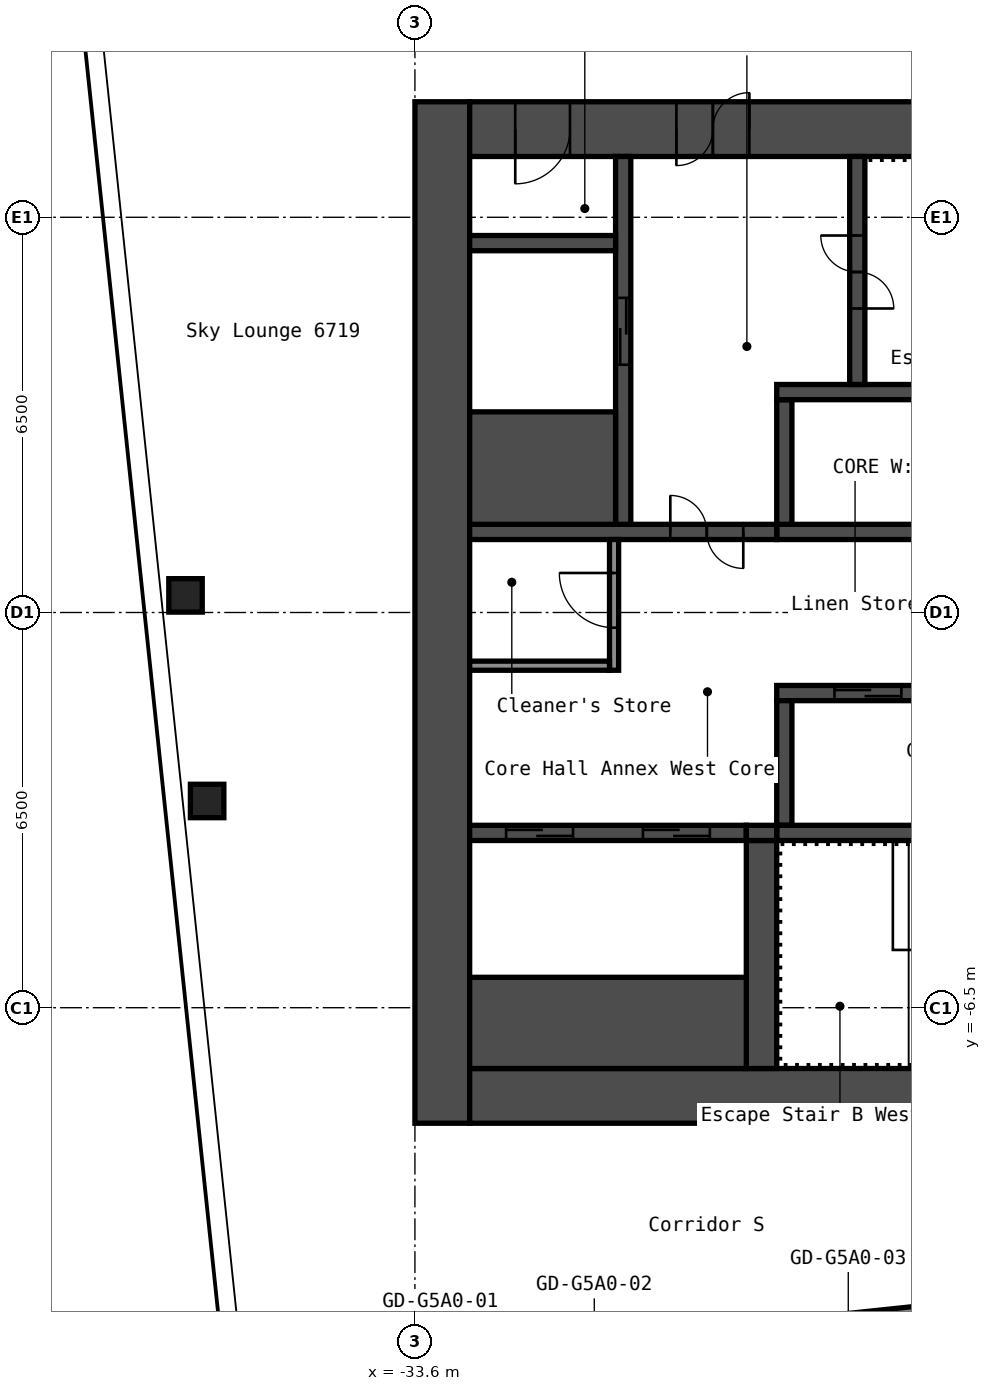
"""IFC4 building model, lengths in metres.
Left out: names, types, materials, properties, quantities, classifications, styles, units other than length and angle.
Written with IfcOpenShell. Run it as: python <this file> out.ifc"""

import sys

from ifc_helpers import new_model, si_unit, direction, frame, frame_2d, origin, origin_2d, place, context, subcontext, project, spatial, rectangle, hollow_rectangle, extrude, element, fill, save


model = new_model("IFC4")
c1 = context("Model", 3, precision=1e-05, world=origin(), true_north=direction((0.0, 1.0)))
c2 = subcontext(c1, "Body", "Model", "MODEL_VIEW")
j1 = project(units=[si_unit("LENGTHUNIT", "METRE"), si_unit("PLANEANGLEUNIT", "RADIAN")], contexts=[c1])
p1 = place(None, origin())
s1 = spatial("IfcSite", under=j1, at=p1, CompositionType="ELEMENT")
p2 = place(p1, origin())
s2 = spatial("IfcBuilding", under=s1, at=p2, CompositionType="ELEMENT")
p3 = place(p2, frame((0.0, 0.0, 239.0)))
s3 = spatial("IfcBuildingStorey", under=s2, at=p3, CompositionType="ELEMENT", Elevation=239.0)
for number, where, z_axis, x_axis in (
    (1, (-37.017, -3.1, 0.0), (0.0, 0.0, 1.0), (1.0, 0.0, 0.0)),
    (2, (-37.373, 0.281, 0.0), (0.0, 0.0, 1.0), (1.0, 0.0, 0.0)),
):
    element("IfcColumn", number, at=place(p3, frame(where, z_axis=z_axis, x_axis=x_axis)), inside=s3, PredefinedType="COLUMN", context=c2, shape_type="SweptSolid", body=[
        extrude(hollow_rectangle(XDim=0.55, YDim=0.55, WallThickness=0.022, InnerFilletRadius=0.033, OuterFilletRadius=0.055, at=origin_2d()), origin(), (0.0, 0.0, 1.0), 2.75),
    ])
p4 = place(p3, frame((-33.15, -8.4, 0.0), z_axis=(0.0, 0.0, 1.0), x_axis=(0.0, 1.0, 0.0)))
e3 = element("IfcWall", 3, at=p4, inside=s3, PredefinedType="SHEAR", context=c2, shape_type="SweptSolid", body=[
    extrude(rectangle(XDim=16.8, YDim=0.9, at=frame_2d((8.4, 0.0))), origin(), (0.0, 0.0, 1.0), 2.75),
])
p5 = place(p3, frame((-32.7, 7.95, 0.0), z_axis=(0.0, 0.0, 1.0), x_axis=(1.0, 0.0, 0.0)))
e4 = element("IfcWall", 4, at=p5, inside=s3, PredefinedType="SHEAR", context=c2, shape_type="SweptSolid", body=[
    extrude(rectangle(XDim=15.0, YDim=0.9, at=frame_2d((7.5, 0.0))), origin(), (0.0, 0.0, 1.0), 2.75),
])
p6 = place(p5, frame((3.4, 0.0, 0.0)))
e5 = element("IfcOpeningElement", 5, at=p6, cuts=e4, PredefinedType="OPENING", context=c2, shape_type="SweptSolid", body=[
    extrude(rectangle(XDim=1.2, YDim=2.1, at=frame_2d((0.6, 1.05))), frame((0.0, 0.46, 0.0), z_axis=(0.0, -1.0, 0.0), x_axis=(1.0, 0.0, 0.0)), (0.0, 0.0, 1.0), 0.92),
])
p7 = place(p5, frame((0.75, 0.0, 0.0)))
e6 = element("IfcOpeningElement", 6, at=p7, cuts=e4, PredefinedType="OPENING", context=c2, shape_type="SweptSolid", body=[
    extrude(rectangle(XDim=0.9, YDim=2.1, at=frame_2d((0.45, 1.05))), frame((0.0, 0.46, 0.0), z_axis=(0.0, -1.0, 0.0), x_axis=(1.0, 0.0, 0.0)), (0.0, 0.0, 1.0), 0.92),
])
p8 = place(p3, frame((-32.7, -7.95, 0.0), z_axis=(0.0, 0.0, 1.0), x_axis=(1.0, 0.0, 0.0)))
e7 = element("IfcWall", 7, at=p8, inside=s3, PredefinedType="SHEAR", context=c2, shape_type="SweptSolid", body=[
    extrude(rectangle(XDim=15.0, YDim=0.9, at=frame_2d((7.5, 0.0))), origin(), (0.0, 0.0, 1.0), 2.75),
])
p9 = place(p8, frame((11.45, 0.0, 0.0)))
e8 = element("IfcOpeningElement", 8, at=p9, cuts=e7, PredefinedType="OPENING", context=c2, shape_type="SweptSolid", body=[
    extrude(rectangle(XDim=1.0, YDim=2.1, at=frame_2d((0.5, 1.05))), frame((0.0, 0.46, 0.0), z_axis=(0.0, -1.0, 0.0), x_axis=(1.0, 0.0, 0.0)), (0.0, 0.0, 1.0), 0.92),
])
p10 = place(p3, frame((-27.65, 1.325, 0.0), z_axis=(0.0, 0.0, 1.0), x_axis=(1.0, 0.0, 0.0)))
e9 = element("IfcWall", 9, at=p10, inside=s3, PredefinedType="SHEAR", context=c2, shape_type="SweptSolid", body=[
    extrude(rectangle(XDim=7.5, YDim=0.25, at=frame_2d((3.75, 0.0))), origin(), (0.0, 0.0, 1.0), 2.75),
])
p11 = place(p10, frame((6.212, 0.0, 0.0)))
e10 = element("IfcOpeningElement", 10, at=p11, cuts=e9, PredefinedType="OPENING", context=c2, shape_type="SweptSolid", body=[
    extrude(rectangle(XDim=0.9, YDim=2.1, at=frame_2d((0.45, 1.05))), frame((0.0, 0.135, 0.0), z_axis=(0.0, -1.0, 0.0), x_axis=(1.0, 0.0, 0.0)), (0.0, 0.0, 1.0), 0.27),
])
p12 = place(p10, frame((2.512, 0.0, 0.0)))
e11 = element("IfcOpeningElement", 11, at=p12, cuts=e9, PredefinedType="OPENING", context=c2, shape_type="SweptSolid", body=[
    extrude(rectangle(XDim=0.9, YDim=2.1, at=frame_2d((0.45, 1.05))), frame((0.0, 0.135, 0.0), z_axis=(0.0, -1.0, 0.0), x_axis=(1.0, 0.0, 0.0)), (0.0, 0.0, 1.0), 0.27),
])
p13 = place(p3, frame((-27.525, 1.45, 0.0), z_axis=(0.0, 0.0, 1.0), x_axis=(0.0, 1.0, 0.0)))
e12 = element("IfcWall", 12, at=p13, inside=s3, PredefinedType="SHEAR", context=c2, shape_type="SweptSolid", body=[
    extrude(rectangle(XDim=2.05, YDim=0.25, at=frame_2d((1.025, 0.0))), origin(), (0.0, 0.0, 1.0), 2.75),
])
p14 = place(p3, frame((-27.65, 3.625, 0.0), z_axis=(0.0, 0.0, 1.0), x_axis=(1.0, 0.0, 0.0)))
e13 = element("IfcWall", 13, at=p14, inside=s3, PredefinedType="SHEAR", context=c2, shape_type="SweptSolid", body=[
    extrude(rectangle(XDim=7.5, YDim=0.25, at=frame_2d((3.75, 0.0))), origin(), (0.0, 0.0, 1.0), 2.75),
])
p15 = place(p3, frame((-26.325, 3.75, 0.0), z_axis=(0.0, 0.0, 1.0), x_axis=(0.0, 1.0, 0.0)))
e14 = element("IfcWall", 14, at=p15, inside=s3, PredefinedType="SHEAR", context=c2, shape_type="SweptSolid", body=[
    extrude(rectangle(XDim=3.75, YDim=0.25, at=frame_2d((1.875, 0.0))), origin(), (0.0, 0.0, 1.0), 2.75),
])
p16 = place(p15, frame((1.25, 0.0, 0.0)))
e15 = element("IfcOpeningElement", 15, at=p16, cuts=e14, PredefinedType="OPENING", context=c2, shape_type="SweptSolid", body=[
    extrude(rectangle(XDim=1.2, YDim=2.1, at=frame_2d((0.6, 1.05))), frame((0.0, 0.135, 0.0), z_axis=(0.0, -1.0, 0.0), x_axis=(1.0, 0.0, 0.0)), (0.0, 0.0, 1.0), 0.27),
])
p17 = place(p3, frame((-32.7, 1.325, 0.0), z_axis=(0.0, 0.0, 1.0), x_axis=(1.0, 0.0, 0.0)))
e16 = element("IfcWall", 16, at=p17, inside=s3, PredefinedType="SHEAR", context=c2, shape_type="SweptSolid", body=[
    extrude(rectangle(XDim=5.05, YDim=0.25, at=frame_2d((2.525, 0.0))), origin(), (0.0, 0.0, 1.0), 2.75),
])
p18 = place(p17, frame((3.3, 0.0, 0.0)))
e17 = element("IfcOpeningElement", 17, at=p18, cuts=e16, PredefinedType="OPENING", context=c2, shape_type="SweptSolid", body=[
    extrude(rectangle(XDim=1.2, YDim=2.1, at=frame_2d((0.6, 1.05))), frame((0.0, 0.135, 0.0), z_axis=(0.0, -1.0, 0.0), x_axis=(1.0, 0.0, 0.0)), (0.0, 0.0, 1.0), 0.27),
])
p19 = place(p3, frame((-30.175, 1.45, 0.0), z_axis=(0.0, 0.0, 1.0), x_axis=(0.0, 1.0, 0.0)))
e18 = element("IfcWall", 18, at=p19, inside=s3, PredefinedType="SHEAR", context=c2, shape_type="SweptSolid", body=[
    extrude(rectangle(XDim=6.05, YDim=0.25, at=frame_2d((3.025, 0.0))), origin(), (0.0, 0.0, 1.0), 2.75),
])
p20 = place(p19, frame((2.625, 0.0, 0.0)))
e19 = element("IfcOpeningElement", 19, at=p20, cuts=e18, PredefinedType="OPENING", context=c2, shape_type="SweptSolid", body=[
    extrude(rectangle(XDim=1.1, YDim=2.1, at=frame_2d((0.55, 1.05))), frame((0.0, 0.135, 0.0), z_axis=(0.0, -1.0, 0.0), x_axis=(1.0, 0.0, 0.0)), (0.0, 0.0, 1.0), 0.27),
])
p21 = place(p3, frame((-32.7, 2.375, 0.0), z_axis=(0.0, 0.0, 1.0), x_axis=(1.0, 0.0, 0.0)))
e20 = element("IfcWall", 20, at=p21, inside=s3, PredefinedType="SHEAR", context=c2, shape_type="SweptSolid", body=[
    extrude(rectangle(XDim=2.4, YDim=1.85, at=frame_2d((1.2, 0.0))), origin(), (0.0, 0.0, 1.0), 2.75),
])
p22 = place(p3, frame((-32.7, 6.075, 0.0), z_axis=(0.0, 0.0, 1.0), x_axis=(1.0, 0.0, 0.0)))
e21 = element("IfcWall", 21, at=p22, inside=s3, PredefinedType="SHEAR", context=c2, shape_type="SweptSolid", body=[
    extrude(rectangle(XDim=2.4, YDim=0.25, at=frame_2d((1.2, 0.0))), origin(), (0.0, 0.0, 1.0), 2.75),
])
p23 = place(p3, frame((-27.65, -1.325, 0.0), z_axis=(0.0, 0.0, 1.0), x_axis=(1.0, 0.0, 0.0)))
e22 = element("IfcWall", 22, at=p23, inside=s3, PredefinedType="SHEAR", context=c2, shape_type="SweptSolid", body=[
    extrude(rectangle(XDim=7.5, YDim=0.25, at=frame_2d((3.75, 0.0))), origin(), (0.0, 0.0, 1.0), 2.75),
])
p24 = place(p23, frame((5.75, 0.0, 0.0)))
e23 = element("IfcOpeningElement", 23, at=p24, cuts=e22, PredefinedType="OPENING", context=c2, shape_type="SweptSolid", body=[
    extrude(rectangle(XDim=1.1, YDim=2.1, at=frame_2d((0.55, 1.05))), frame((0.0, 0.135, 0.0), z_axis=(0.0, -1.0, 0.0), x_axis=(1.0, 0.0, 0.0)), (0.0, 0.0, 1.0), 0.27),
])
p25 = place(p23, frame((3.35, 0.0, 0.0)))
e24 = element("IfcOpeningElement", 24, at=p25, cuts=e22, PredefinedType="OPENING", context=c2, shape_type="SweptSolid", body=[
    extrude(rectangle(XDim=1.1, YDim=2.1, at=frame_2d((0.55, 1.05))), frame((0.0, 0.135, 0.0), z_axis=(0.0, -1.0, 0.0), x_axis=(1.0, 0.0, 0.0)), (0.0, 0.0, 1.0), 0.27),
])
p26 = place(p23, frame((0.95, 0.0, 0.0)))
e25 = element("IfcOpeningElement", 25, at=p26, cuts=e22, PredefinedType="OPENING", context=c2, shape_type="SweptSolid", body=[
    extrude(rectangle(XDim=1.1, YDim=2.1, at=frame_2d((0.55, 1.05))), frame((0.0, 0.135, 0.0), z_axis=(0.0, -1.0, 0.0), x_axis=(1.0, 0.0, 0.0)), (0.0, 0.0, 1.0), 0.27),
])
p27 = place(p3, frame((-27.525, -3.5, 0.0), z_axis=(0.0, 0.0, 1.0), x_axis=(0.0, 1.0, 0.0)))
e26 = element("IfcWall", 26, at=p27, inside=s3, PredefinedType="SHEAR", context=c2, shape_type="SweptSolid", body=[
    extrude(rectangle(XDim=2.05, YDim=0.25, at=frame_2d((1.025, 0.0))), origin(), (0.0, 0.0, 1.0), 2.75),
])
p28 = place(p3, frame((-27.65, -3.625, 0.0), z_axis=(0.0, 0.0, 1.0), x_axis=(1.0, 0.0, 0.0)))
e27 = element("IfcWall", 27, at=p28, inside=s3, PredefinedType="SHEAR", context=c2, shape_type="SweptSolid", body=[
    extrude(rectangle(XDim=7.5, YDim=0.25, at=frame_2d((3.75, 0.0))), origin(), (0.0, 0.0, 1.0), 2.75),
])
p29 = place(p3, frame((-27.9, -7.5, 0.0), z_axis=(0.0, 0.0, 1.0), x_axis=(0.0, 1.0, 0.0)))
e28 = element("IfcWall", 28, at=p29, inside=s3, PredefinedType="SHEAR", context=c2, shape_type="SweptSolid", body=[
    extrude(rectangle(XDim=3.75, YDim=0.5, at=frame_2d((1.875, 0.0))), origin(), (0.0, 0.0, 1.0), 2.75),
])
p30 = place(p3, frame((-32.7, -3.625, 0.0), z_axis=(0.0, 0.0, 1.0), x_axis=(1.0, 0.0, 0.0)))
e29 = element("IfcWall", 29, at=p30, inside=s3, PredefinedType="SHEAR", context=c2, shape_type="SweptSolid", body=[
    extrude(rectangle(XDim=4.55, YDim=0.25, at=frame_2d((2.275, 0.0))), origin(), (0.0, 0.0, 1.0), 2.75),
])
p31 = place(p30, frame((2.85, 0.0, 0.0)))
e30 = element("IfcOpeningElement", 30, at=p31, cuts=e29, PredefinedType="OPENING", context=c2, shape_type="SweptSolid", body=[
    extrude(rectangle(XDim=1.1, YDim=2.1, at=frame_2d((0.55, 1.05))), frame((0.0, 0.135, 0.0), z_axis=(0.0, -1.0, 0.0), x_axis=(1.0, 0.0, 0.0)), (0.0, 0.0, 1.0), 0.27),
])
p32 = place(p30, frame((0.6, 0.0, 0.0)))
e31 = element("IfcOpeningElement", 31, at=p32, cuts=e29, PredefinedType="OPENING", context=c2, shape_type="SweptSolid", body=[
    extrude(rectangle(XDim=1.1, YDim=2.1, at=frame_2d((0.55, 1.05))), frame((0.0, 0.135, 0.0), z_axis=(0.0, -1.0, 0.0), x_axis=(1.0, 0.0, 0.0)), (0.0, 0.0, 1.0), 0.27),
])
p33 = place(p3, frame((-32.7, -6.75, 0.0), z_axis=(0.0, 0.0, 1.0), x_axis=(1.0, 0.0, 0.0)))
e32 = element("IfcWall", 32, at=p33, inside=s3, PredefinedType="SHEAR", context=c2, shape_type="SweptSolid", body=[
    extrude(rectangle(XDim=4.55, YDim=1.5, at=frame_2d((2.275, 0.0))), origin(), (0.0, 0.0, 1.0), 2.75),
])
p34 = place(p3, frame((-28.15, -3.625, 0.0), z_axis=(0.0, 0.0, 1.0), x_axis=(1.0, 0.0, 0.0)))
e33 = element("IfcWall", 33, at=p34, inside=s3, PredefinedType="SHEAR", context=c2, shape_type="SweptSolid", body=[
    extrude(rectangle(XDim=0.5, YDim=0.25, at=frame_2d((0.25, 0.0))), origin(), (0.0, 0.0, 1.0), 2.75),
])
p35 = place(p3, frame((-30.325, -0.95, 0.0), z_axis=(0.0, 0.0, 1.0), x_axis=(0.0, 1.0, 0.0)))
e34 = element("IfcWall", 34, at=p35, inside=s3, PredefinedType="PARTITIONING", context=c2, shape_type="SweptSolid", body=[
    extrude(rectangle(XDim=2.15, YDim=0.15, at=frame_2d((1.075, 0.0))), origin(), (0.0, 0.0, 1.0), 2.75),
])
p36 = place(p35, frame((0.7, 0.0, 0.0)))
e35 = element("IfcOpeningElement", 35, at=p36, cuts=e34, PredefinedType="OPENING", context=c2, shape_type="SweptSolid", body=[
    extrude(rectangle(XDim=0.9, YDim=2.1, at=frame_2d((0.45, 1.05))), frame((0.0, 0.085, 0.0), z_axis=(0.0, -1.0, 0.0), x_axis=(1.0, 0.0, 0.0)), (0.0, 0.0, 1.0), 0.17),
])
p37 = place(p3, frame((-32.7, -0.875, 0.0), z_axis=(0.0, 0.0, 1.0), x_axis=(1.0, 0.0, 0.0)))
e36 = element("IfcWall", 36, at=p37, inside=s3, PredefinedType="PARTITIONING", context=c2, shape_type="SweptSolid", body=[
    extrude(rectangle(XDim=2.3, YDim=0.15, at=frame_2d((1.15, 0.0))), origin(), (0.0, 0.0, 1.0), 2.75),
])
p38 = place(p3, frame((-36.712, -12.705, 0.0), z_axis=(0.0, 0.0, 1.0), x_axis=(0.994522460242, 0.104523088709, 0.0)))
e37 = element("IfcWall", 37, at=p38, inside=s3, PredefinedType="PARTITIONING", context=c2, shape_type="SweptSolid", body=[
    extrude(rectangle(XDim=21.3, YDim=0.2, at=frame_2d((10.65, 0.0))), origin(), (0.0, 0.0, 1.0), 2.75),
])
p39 = place(p38, frame((3.05, 0.0, 0.0)))
e38 = element("IfcOpeningElement", 38, at=p39, cuts=e37, PredefinedType="OPENING", context=c2, shape_type="SweptSolid", body=[
    extrude(rectangle(XDim=1.0, YDim=2.1, at=frame_2d((0.5, 1.05))), frame((0.0, 0.11, 0.0), z_axis=(0.0, -1.0, 0.0), x_axis=(1.0, 0.0, 0.0)), (0.0, 0.0, 1.0), 0.22),
])
p40 = place(p38, frame((5.645, 0.0, 0.0)))
e39 = element("IfcOpeningElement", 39, at=p40, cuts=e37, PredefinedType="OPENING", context=c2, shape_type="SweptSolid", body=[
    extrude(rectangle(XDim=0.9, YDim=2.1, at=frame_2d((0.45, 1.05))), frame((0.0, 0.11, 0.0), z_axis=(0.0, -1.0, 0.0), x_axis=(1.0, 0.0, 0.0)), (0.0, 0.0, 1.0), 0.22),
])
p41 = place(p38, frame((9.845, 0.0, 0.0)))
e40 = element("IfcOpeningElement", 40, at=p41, cuts=e37, PredefinedType="OPENING", context=c2, shape_type="SweptSolid", body=[
    extrude(rectangle(XDim=0.9, YDim=2.1, at=frame_2d((0.45, 1.05))), frame((0.0, 0.11, 0.0), z_axis=(0.0, -1.0, 0.0), x_axis=(1.0, 0.0, 0.0)), (0.0, 0.0, 1.0), 0.22),
])
p42 = place(p38, frame((13.96, 0.0, 0.0)))
e41 = element("IfcOpeningElement", 41, at=p42, cuts=e37, PredefinedType="OPENING", context=c2, shape_type="SweptSolid", body=[
    extrude(rectangle(XDim=0.9, YDim=2.1, at=frame_2d((0.45, 1.05))), frame((0.0, 0.11, 0.0), z_axis=(0.0, -1.0, 0.0), x_axis=(1.0, 0.0, 0.0)), (0.0, 0.0, 1.0), 0.22),
])
p43 = place(p38, frame((18.16, 0.0, 0.0)))
e42 = element("IfcOpeningElement", 42, at=p43, cuts=e37, PredefinedType="OPENING", context=c2, shape_type="SweptSolid", body=[
    extrude(rectangle(XDim=0.9, YDim=2.1, at=frame_2d((0.45, 1.05))), frame((0.0, 0.11, 0.0), z_axis=(0.0, -1.0, 0.0), x_axis=(1.0, 0.0, 0.0)), (0.0, 0.0, 1.0), 0.22),
])
p44 = place(p6, origin())
e43 = element("IfcDoor", 43, at=p44, inside=s3, OperationType="DOUBLE_DOOR_SINGLE_SWING", PredefinedType="DOOR", context=c2, shape_type="SweptSolid", body=[
    extrude(rectangle(XDim=1.2, YDim=2.1, at=frame_2d((0.6, 1.05))), frame((0.0, 0.025, 0.0), z_axis=(0.0, -1.0, 0.0), x_axis=(1.0, 0.0, 0.0)), (0.0, 0.0, 1.0), 0.05),
])
fill(e5, e43)
p45 = place(p7, origin())
e44 = element("IfcDoor", 44, at=p45, inside=s3, OperationType="SINGLE_SWING_LEFT", PredefinedType="DOOR", context=c2, shape_type="SweptSolid", body=[
    extrude(rectangle(XDim=0.9, YDim=2.1, at=frame_2d((0.45, 1.05))), frame((0.0, 0.025, 0.0), z_axis=(0.0, -1.0, 0.0), x_axis=(1.0, 0.0, 0.0)), (0.0, 0.0, 1.0), 0.05),
])
fill(e6, e44)
p46 = place(p16, origin())
e45 = element("IfcDoor", 45, at=p46, inside=s3, OperationType="DOUBLE_DOOR_SINGLE_SWING", PredefinedType="DOOR", context=c2, shape_type="SweptSolid", body=[
    extrude(rectangle(XDim=1.2, YDim=2.1, at=frame_2d((0.6, 1.05))), frame((0.0, 0.025, 0.0), z_axis=(0.0, -1.0, 0.0), x_axis=(1.0, 0.0, 0.0)), (0.0, 0.0, 1.0), 0.05),
])
fill(e15, e45)
p47 = place(p18, origin())
e46 = element("IfcDoor", 46, at=p47, inside=s3, OperationType="DOUBLE_DOOR_SINGLE_SWING", PredefinedType="DOOR", context=c2, shape_type="SweptSolid", body=[
    extrude(rectangle(XDim=1.2, YDim=2.1, at=frame_2d((0.6, 1.05))), frame((0.0, 0.025, 0.0), z_axis=(0.0, -1.0, 0.0), x_axis=(1.0, 0.0, 0.0)), (0.0, 0.0, 1.0), 0.05),
])
fill(e17, e46)
p48 = place(p36, origin())
e47 = element("IfcDoor", 47, at=p48, inside=s3, OperationType="SINGLE_SWING_LEFT", PredefinedType="DOOR", context=c2, shape_type="SweptSolid", body=[
    extrude(rectangle(XDim=0.9, YDim=2.1, at=frame_2d((0.45, 1.05))), frame((0.0, 0.025, 0.0), z_axis=(0.0, -1.0, 0.0), x_axis=(1.0, 0.0, 0.0)), (0.0, 0.0, 1.0), 0.05),
])
fill(e35, e47)
p49 = place(p26, origin())
e48 = element("IfcDoor", 48, at=p49, inside=s3, OperationType="DOUBLE_DOOR_SLIDING", PredefinedType="DOOR", context=c2, shape_type="SweptSolid", body=[
    extrude(rectangle(XDim=1.1, YDim=2.1, at=frame_2d((0.55, 1.05))), frame((0.0, 0.025, 0.0), z_axis=(0.0, -1.0, 0.0), x_axis=(1.0, 0.0, 0.0)), (0.0, 0.0, 1.0), 0.05),
])
fill(e25, e48)
p50 = place(p20, origin())
e49 = element("IfcDoor", 49, at=p50, inside=s3, OperationType="DOUBLE_DOOR_SLIDING", PredefinedType="DOOR", context=c2, shape_type="SweptSolid", body=[
    extrude(rectangle(XDim=1.1, YDim=2.1, at=frame_2d((0.55, 1.05))), frame((0.0, 0.025, 0.0), z_axis=(0.0, -1.0, 0.0), x_axis=(1.0, 0.0, 0.0)), (0.0, 0.0, 1.0), 0.05),
])
fill(e19, e49)
p51 = place(p31, origin())
e50 = element("IfcDoor", 50, at=p51, inside=s3, OperationType="DOUBLE_DOOR_SLIDING", PredefinedType="DOOR", context=c2, shape_type="SweptSolid", body=[
    extrude(rectangle(XDim=1.1, YDim=2.1, at=frame_2d((0.55, 1.05))), frame((0.0, 0.025, 0.0), z_axis=(0.0, -1.0, 0.0), x_axis=(1.0, 0.0, 0.0)), (0.0, 0.0, 1.0), 0.05),
])
fill(e30, e50)
p52 = place(p32, origin())
e51 = element("IfcDoor", 51, at=p52, inside=s3, OperationType="DOUBLE_DOOR_SLIDING", PredefinedType="DOOR", context=c2, shape_type="SweptSolid", body=[
    extrude(rectangle(XDim=1.1, YDim=2.1, at=frame_2d((0.55, 1.05))), frame((0.0, 0.025, 0.0), z_axis=(0.0, -1.0, 0.0), x_axis=(1.0, 0.0, 0.0)), (0.0, 0.0, 1.0), 0.05),
])
fill(e31, e51)
save(model, sys.argv[1])
